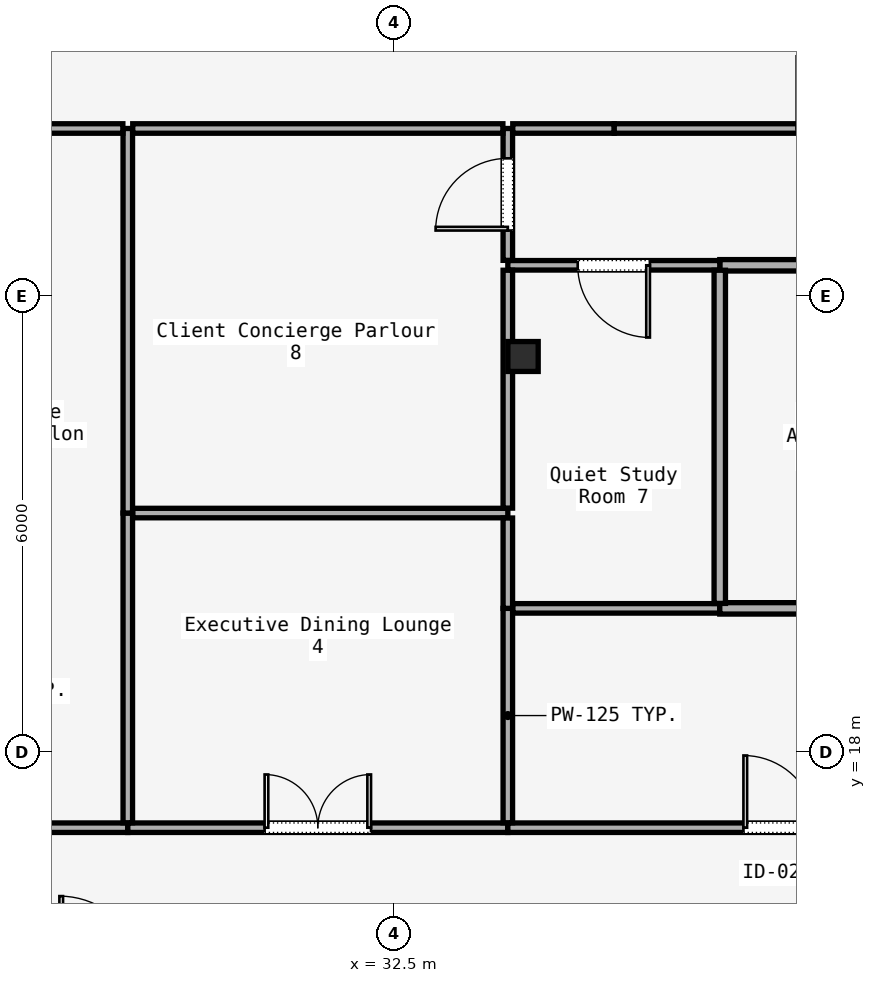
"""IFC4 building model, lengths in metres.
Left out: names, types, materials, properties, quantities, classifications, styles, units other than length and angle.
Written with IfcOpenShell. Run it as: python <this file> out.ifc"""

import sys

from ifc_helpers import new_model, si_unit, direction, frame, frame_2d, origin, origin_2d, place, context, subcontext, project, spatial, rectangle, i_section, extrude, element, fill, save


model = new_model("IFC4")
c1 = context("Model", 3, precision=1e-05, world=origin(), true_north=direction((0.0, 1.0)))
c2 = subcontext(c1, "Body", "Model", "MODEL_VIEW")
j1 = project(units=[si_unit("LENGTHUNIT", "METRE"), si_unit("PLANEANGLEUNIT", "RADIAN")], contexts=[c1])
p1 = place(None, origin())
s1 = spatial("IfcSite", under=j1, at=p1, CompositionType="ELEMENT")
p2 = place(p1, origin())
s2 = spatial("IfcBuilding", under=s1, at=p2, CompositionType="ELEMENT")
p3 = place(p2, frame((0.0, 0.0, 208.4)))
s3 = spatial("IfcBuildingStorey", under=s2, at=p3, CompositionType="ELEMENT", Elevation=208.4)
p4 = place(p3, frame((34.2, 23.2, 0.0), z_axis=(0.0, 0.0, 1.0), x_axis=(1.0, 0.0, 0.0)))
e1 = element("IfcColumn", 1, at=p4, inside=s3, PredefinedType="COLUMN", context=c2, shape_type="SweptSolid", body=[
    extrude(i_section(OverallWidth=0.399, OverallDepth=0.394, WebThickness=0.023, FlangeThickness=0.037, FilletRadius=0.015, at=origin_2d()), origin(), (0.0, 0.0, 1.0), 4.52),
])
p5 = place(p3, frame((25.868, 17.0, 0.0), z_axis=(0.0, 0.0, 1.0), x_axis=(1.0, 0.0, 0.0)))
e2 = element("IfcWall", 2, at=p5, inside=s3, PredefinedType="PARTITIONING", context=c2, shape_type="SweptSolid", body=[
    extrude(rectangle(XDim=3.132, YDim=0.125, at=frame_2d((1.566, 0.0))), origin(), (0.0, 0.0, 1.0), 3.39),
])
p6 = place(p5, frame((1.091, 0.0, 0.0)))
e3 = element("IfcOpeningElement", 3, at=p6, cuts=e2, PredefinedType="OPENING", context=c2, shape_type="SweptSolid", body=[
    extrude(rectangle(XDim=0.95, YDim=2.2, at=frame_2d((0.475, 1.1))), frame((0.0, 0.062, 0.0), z_axis=(0.0, -1.0, 0.0), x_axis=(1.0, 0.0, 0.0)), (0.0, 0.0, 1.0), 0.125),
])
p7 = place(p3, frame((29.0, 17.0, 0.0), z_axis=(0.0, 0.0, 1.0), x_axis=(1.0, 0.0, 0.0)))
e4 = element("IfcWall", 4, at=p7, inside=s3, PredefinedType="PARTITIONING", context=c2, shape_type="SweptSolid", body=[
    extrude(rectangle(XDim=5.0, YDim=0.125, at=frame_2d((2.5, 0.0))), origin(), (0.0, 0.0, 1.0), 3.39),
])
p8 = place(p7, frame((1.8, 0.0, 0.0)))
e5 = element("IfcOpeningElement", 5, at=p8, cuts=e4, PredefinedType="OPENING", context=c2, shape_type="SweptSolid", body=[
    extrude(rectangle(XDim=1.4, YDim=2.2, at=frame_2d((0.7, 1.1))), frame((0.0, 0.062, 0.0), z_axis=(0.0, -1.0, 0.0), x_axis=(1.0, 0.0, 0.0)), (0.0, 0.0, 1.0), 0.125),
])
p9 = place(p3, frame((34.0, 17.0, 0.0), z_axis=(0.0, 0.0, 1.0), x_axis=(1.0, 0.0, 0.0)))
e6 = element("IfcWall", 6, at=p9, inside=s3, PredefinedType="PARTITIONING", context=c2, shape_type="SweptSolid", body=[
    extrude(rectangle(XDim=7.15, YDim=0.125, at=frame_2d((3.575, 0.0))), origin(), (0.0, 0.0, 1.0), 3.39),
])
p10 = place(p9, frame((3.1, 0.0, 0.0)))
e7 = element("IfcOpeningElement", 7, at=p10, cuts=e6, PredefinedType="OPENING", context=c2, shape_type="SweptSolid", body=[
    extrude(rectangle(XDim=0.95, YDim=2.2, at=frame_2d((0.475, 1.1))), frame((0.0, 0.062, 0.0), z_axis=(0.0, -1.0, 0.0), x_axis=(1.0, 0.0, 0.0)), (0.0, 0.0, 1.0), 0.125),
])
p11 = place(p3, frame((41.085, 24.4, 0.0), z_axis=(0.0, 0.0, 1.0), x_axis=(-1.0, 0.0, 0.0)))
e8 = element("IfcWall", 8, at=p11, inside=s3, PredefinedType="PARTITIONING", context=c2, shape_type="SweptSolid", body=[
    extrude(rectangle(XDim=4.296, YDim=0.15, at=frame_2d((2.148, 0.0))), origin(), (0.0, 0.0, 1.0), 3.39),
])
p12 = place(p3, frame((36.789, 24.4, 0.0), z_axis=(0.0, 0.0, 1.0), x_axis=(-1.0, 0.0, 0.0)))
e9 = element("IfcWall", 9, at=p12, inside=s3, PredefinedType="PARTITIONING", context=c2, shape_type="SweptSolid", body=[
    extrude(rectangle(XDim=2.789, YDim=0.125, at=frame_2d((1.394, 0.0))), origin(), (0.0, 0.0, 1.0), 3.39),
])
p13 = place(p12, frame((0.919, 0.0, 0.0)))
e10 = element("IfcOpeningElement", 10, at=p13, cuts=e9, PredefinedType="OPENING", context=c2, shape_type="SweptSolid", body=[
    extrude(rectangle(XDim=0.95, YDim=2.2, at=frame_2d((0.475, 1.1))), frame((0.0, 0.062, 0.0), z_axis=(0.0, -1.0, 0.0), x_axis=(1.0, 0.0, 0.0)), (0.0, 0.0, 1.0), 0.125),
])
p14 = place(p3, frame((34.0, 24.465, 0.0), z_axis=(0.0, 0.0, 1.0), x_axis=(0.0, 1.0, 0.0)))
e11 = element("IfcWall", 11, at=p14, inside=s3, PredefinedType="PARTITIONING", context=c2, shape_type="SweptSolid", body=[
    extrude(rectangle(XDim=1.735, YDim=0.125, at=frame_2d((0.867, 0.0))), origin(), (0.0, 0.0, 1.0), 3.39),
])
p15 = place(p14, frame((0.393, 0.0, 0.0)))
e12 = element("IfcOpeningElement", 12, at=p15, cuts=e11, PredefinedType="OPENING", context=c2, shape_type="SweptSolid", body=[
    extrude(rectangle(XDim=0.95, YDim=2.2, at=frame_2d((0.475, 1.1))), frame((0.0, 0.062, 0.0), z_axis=(0.0, -1.0, 0.0), x_axis=(1.0, 0.0, 0.0)), (0.0, 0.0, 1.0), 0.125),
])
p16 = place(p3, frame((34.065, 26.2, 0.0), z_axis=(0.0, 0.0, 1.0), x_axis=(1.0, 0.0, 0.0)))
e13 = element("IfcWall", 13, at=p16, inside=s3, PredefinedType="PARTITIONING", context=c2, shape_type="SweptSolid", body=[
    extrude(rectangle(XDim=1.335, YDim=0.125, at=frame_2d((0.667, 0.0))), origin(), (0.0, 0.0, 1.0), 3.39),
])
p17 = place(p3, frame((35.4, 26.2, 0.0), z_axis=(0.0, 0.0, 1.0), x_axis=(1.0, 0.0, 0.0)))
e14 = element("IfcWall", 14, at=p17, inside=s3, PredefinedType="PARTITIONING", context=c2, shape_type="SweptSolid", body=[
    extrude(rectangle(XDim=5.75, YDim=0.125, at=frame_2d((2.875, 0.0))), origin(), (0.0, 0.0, 1.0), 3.39),
])
p18 = place(p17, frame((2.4, 0.0, 0.0)))
e15 = element("IfcOpeningElement", 15, at=p18, cuts=e14, PredefinedType="OPENING", context=c2, shape_type="SweptSolid", body=[
    extrude(rectangle(XDim=0.95, YDim=2.2, at=frame_2d((0.475, 1.1))), frame((0.0, 0.062, 0.0), z_axis=(0.0, -1.0, 0.0), x_axis=(1.0, 0.0, 0.0)), (0.0, 0.0, 1.0), 0.125),
])
p19 = place(p3, frame((34.0, 17.065, 0.0), z_axis=(0.0, 0.0, 1.0), x_axis=(0.0, 1.0, 0.0)))
e16 = element("IfcWall", 16, at=p19, inside=s3, PredefinedType="PARTITIONING", context=c2, shape_type="SweptSolid", body=[
    extrude(rectangle(XDim=2.821, YDim=0.125, at=frame_2d((1.411, 0.0))), origin(), (0.0, 0.0, 1.0), 3.39),
])
p20 = place(p3, frame((34.065, 19.886, 0.0), z_axis=(0.0, 0.0, 1.0), x_axis=(1.0, 0.0, 0.0)))
e17 = element("IfcWall", 17, at=p20, inside=s3, PredefinedType="PARTITIONING", context=c2, shape_type="SweptSolid", body=[
    extrude(rectangle(XDim=2.724, YDim=0.125, at=frame_2d((1.362, 0.0))), origin(), (0.0, 0.0, 1.0), 3.39),
])
p21 = place(p3, frame((36.789, 19.886, 0.0), z_axis=(0.0, 0.0, 1.0), x_axis=(1.0, 0.0, 0.0)))
e18 = element("IfcWall", 18, at=p21, inside=s3, PredefinedType="PARTITIONING", context=c2, shape_type="SweptSolid", body=[
    extrude(rectangle(XDim=4.296, YDim=0.15, at=frame_2d((2.148, 0.0))), origin(), (0.0, 0.0, 1.0), 3.39),
])
p22 = place(p3, frame((29.0, 17.065, 0.0), z_axis=(0.0, 0.0, 1.0), x_axis=(0.0, 1.0, 0.0)))
e19 = element("IfcWall", 19, at=p22, inside=s3, PredefinedType="PARTITIONING", context=c2, shape_type="SweptSolid", body=[
    extrude(rectangle(XDim=4.075, YDim=0.125, at=frame_2d((2.038, 0.0))), origin(), (0.0, 0.0, 1.0), 3.39),
])
p23 = place(p3, frame((29.065, 21.14, 0.0), z_axis=(0.0, 0.0, 1.0), x_axis=(1.0, 0.0, 0.0)))
e20 = element("IfcWall", 20, at=p23, inside=s3, PredefinedType="PARTITIONING", context=c2, shape_type="SweptSolid", body=[
    extrude(rectangle(XDim=4.935, YDim=0.125, at=frame_2d((2.468, 0.0))), origin(), (0.0, 0.0, 1.0), 3.39),
])
p24 = place(p3, frame((34.0, 21.075, 0.0), z_axis=(0.0, 0.0, 1.0), x_axis=(0.0, -1.0, 0.0)))
e21 = element("IfcWall", 21, at=p24, inside=s3, PredefinedType="PARTITIONING", context=c2, shape_type="SweptSolid", body=[
    extrude(rectangle(XDim=1.189, YDim=0.125, at=frame_2d((0.594, 0.0))), origin(), (0.0, 0.0, 1.0), 3.39),
])
p25 = place(p3, frame((29.0, 26.2, 0.0), z_axis=(0.0, 0.0, 1.0), x_axis=(0.0, -1.0, 0.0)))
e22 = element("IfcWall", 22, at=p25, inside=s3, PredefinedType="PARTITIONING", context=c2, shape_type="SweptSolid", body=[
    extrude(rectangle(XDim=5.06, YDim=0.125, at=frame_2d((2.53, 0.0))), origin(), (0.0, 0.0, 1.0), 3.39),
])
p26 = place(p3, frame((25.868, 26.2, 0.0), z_axis=(0.0, 0.0, 1.0), x_axis=(1.0, 0.0, 0.0)))
e23 = element("IfcWall", 23, at=p26, inside=s3, PredefinedType="PARTITIONING", context=c2, shape_type="SweptSolid", body=[
    extrude(rectangle(XDim=3.067, YDim=0.125, at=frame_2d((1.534, 0.0))), origin(), (0.0, 0.0, 1.0), 3.39),
])
p27 = place(p3, frame((36.789, 24.335, 0.0), z_axis=(0.0, 0.0, 1.0), x_axis=(0.0, -1.0, 0.0)))
e24 = element("IfcWall", 24, at=p27, inside=s3, PredefinedType="PARTITIONING", context=c2, shape_type="SweptSolid", body=[
    extrude(rectangle(XDim=4.384, YDim=0.15, at=frame_2d((2.192, 0.0))), origin(), (0.0, 0.0, 1.0), 3.39),
])
p28 = place(p3, frame((34.0, 21.205, 0.0), z_axis=(0.0, 0.0, 1.0), x_axis=(0.0, 1.0, 0.0)))
e25 = element("IfcWall", 25, at=p28, inside=s3, PredefinedType="PARTITIONING", context=c2, shape_type="SweptSolid", body=[
    extrude(rectangle(XDim=3.13, YDim=0.125, at=frame_2d((1.565, 0.0))), origin(), (0.0, 0.0, 1.0), 3.39),
])
p29 = place(p3, frame((29.065, 26.2, 0.0), z_axis=(0.0, 0.0, 1.0), x_axis=(1.0, 0.0, 0.0)))
e26 = element("IfcWall", 26, at=p29, inside=s3, PredefinedType="PARTITIONING", context=c2, shape_type="SweptSolid", body=[
    extrude(rectangle(XDim=4.87, YDim=0.125, at=frame_2d((2.435, 0.0))), origin(), (0.0, 0.0, 1.0), 3.39),
])
p30 = place(p10, origin())
e27 = element("IfcDoor", 27, at=p30, inside=s3, OperationType="SINGLE_SWING_RIGHT", PredefinedType="DOOR", context=c2, shape_type="SweptSolid", body=[
    extrude(rectangle(XDim=0.95, YDim=2.2, at=frame_2d((0.475, 1.1))), frame((0.0, 0.025, 0.0), z_axis=(0.0, -1.0, 0.0), x_axis=(1.0, 0.0, 0.0)), (0.0, 0.0, 1.0), 0.05),
])
fill(e7, e27)
p31 = place(p8, origin())
e28 = element("IfcDoor", 28, at=p31, inside=s3, OperationType="SINGLE_SWING_LEFT", PredefinedType="DOOR", context=c2, shape_type="SweptSolid", body=[
    extrude(rectangle(XDim=1.4, YDim=2.2, at=frame_2d((0.7, 1.1))), frame((0.0, 0.025, 0.0), z_axis=(0.0, -1.0, 0.0), x_axis=(1.0, 0.0, 0.0)), (0.0, 0.0, 1.0), 0.05),
])
fill(e5, e28)
p32 = place(p13, origin())
e29 = element("IfcDoor", 29, at=p32, inside=s3, OperationType="SINGLE_SWING_RIGHT", PredefinedType="DOOR", context=c2, shape_type="SweptSolid", body=[
    extrude(rectangle(XDim=0.95, YDim=2.2, at=frame_2d((0.475, 1.1))), frame((0.0, 0.025, 0.0), z_axis=(0.0, -1.0, 0.0), x_axis=(1.0, 0.0, 0.0)), (0.0, 0.0, 1.0), 0.05),
])
fill(e10, e29)
p33 = place(p15, origin())
e30 = element("IfcDoor", 30, at=p33, inside=s3, OperationType="SINGLE_SWING_RIGHT", PredefinedType="DOOR", context=c2, shape_type="SweptSolid", body=[
    extrude(rectangle(XDim=0.95, YDim=2.2, at=frame_2d((0.475, 1.1))), frame((0.0, 0.025, 0.0), z_axis=(0.0, -1.0, 0.0), x_axis=(1.0, 0.0, 0.0)), (0.0, 0.0, 1.0), 0.05),
])
fill(e12, e30)
save(model, sys.argv[1])
